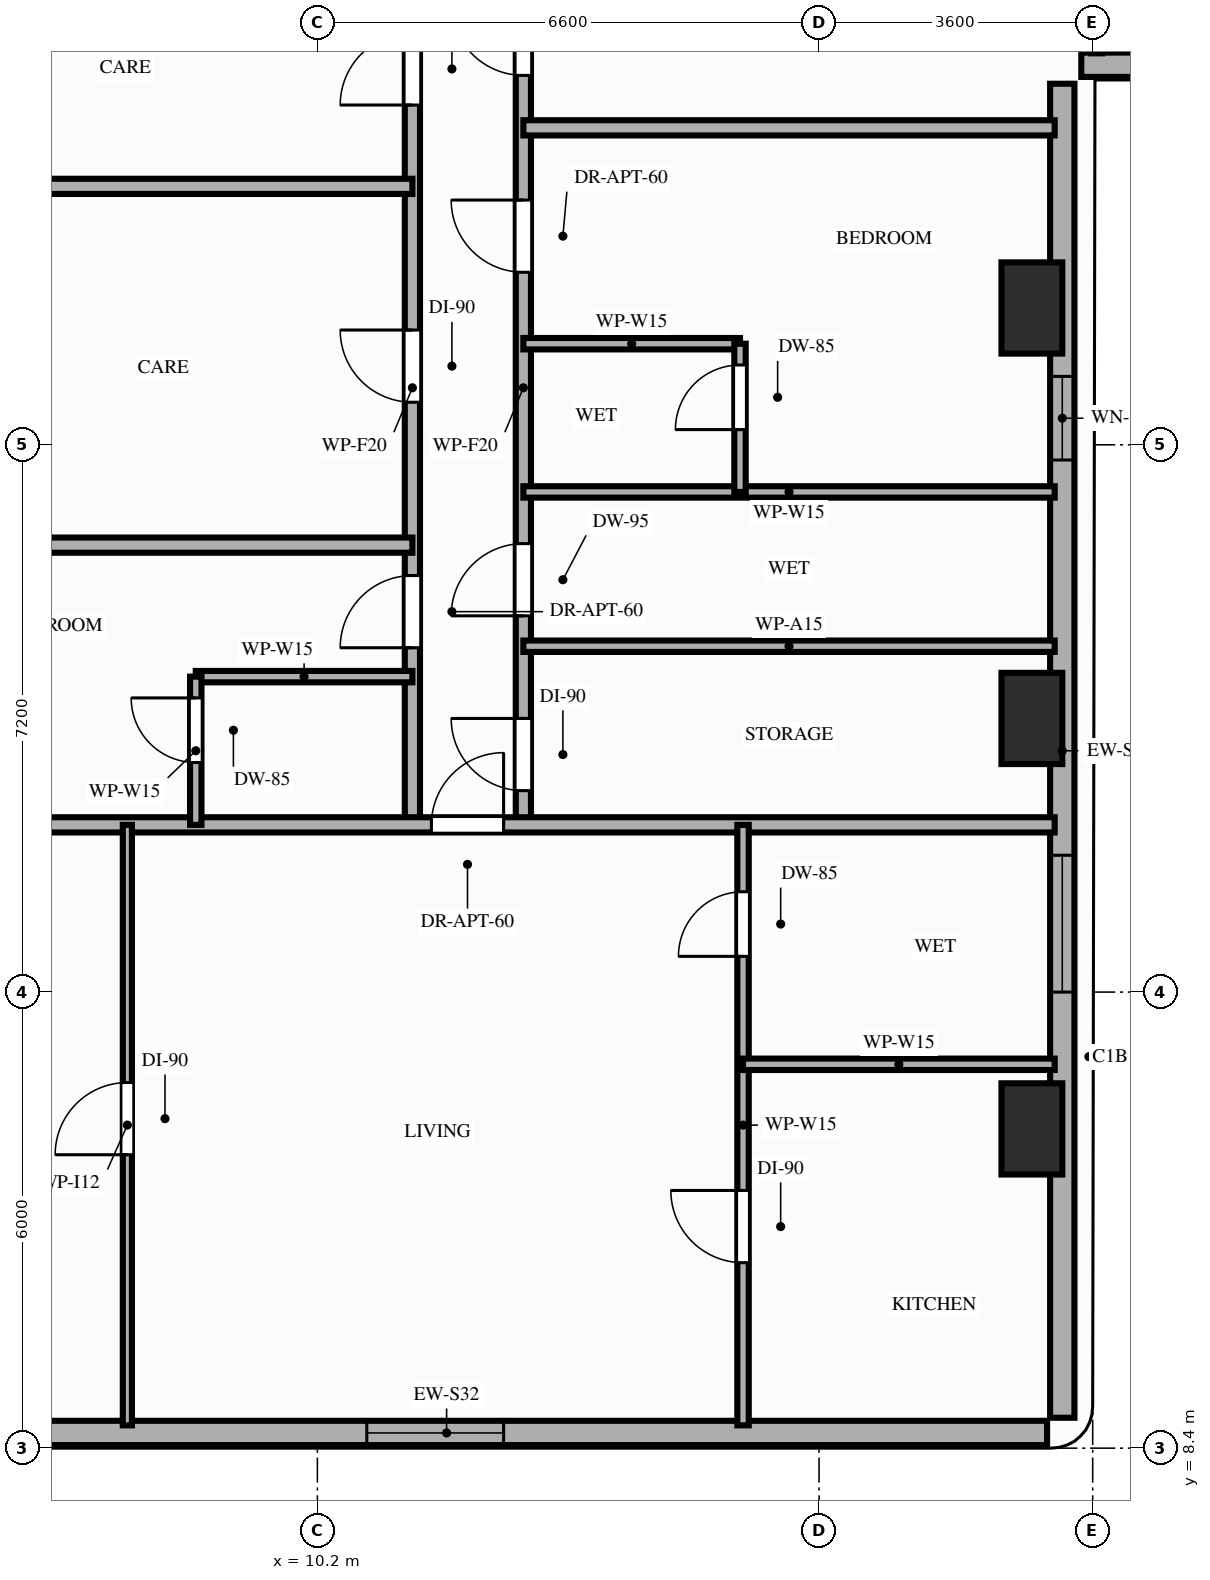
"""IFC4 building model, lengths in metres.
Left out: names, types, materials, properties, quantities, classifications, styles, units other than length and angle.
Written with IfcOpenShell. Run it as: python <this file> out.ifc"""

import sys

from ifc_helpers import new_model, si_unit, direction, frame, frame_2d, origin, origin_2d, place, context, subcontext, project, spatial, rectangle, extrude, element, fill, save


model = new_model("IFC4")
c1 = context("Model", 3, precision=1e-05, world=origin(), true_north=direction((0.0, 1.0)))
c2 = subcontext(c1, "Body", "Model", "MODEL_VIEW")
j1 = project(units=[si_unit("LENGTHUNIT", "METRE"), si_unit("PLANEANGLEUNIT", "RADIAN")], contexts=[c1])
p1 = place(None, origin())
s1 = spatial("IfcSite", under=j1, at=p1, CompositionType="ELEMENT")
p2 = place(p1, origin())
s2 = spatial("IfcBuilding", under=s1, at=p2, CompositionType="ELEMENT")
p3 = place(p2, frame((0.0, 0.0, 93.0)))
s3 = spatial("IfcBuildingStorey", under=s2, at=p3, CompositionType="ELEMENT", Elevation=93.0)
for number, where, z_axis, x_axis in (
    (1, (19.6, 12.6, 0.0), (0.0, 0.0, 1.0), (1.0, 0.0, 0.0)),
    (2, (19.6, 18.0, 0.0), (0.0, 0.0, 1.0), (1.0, 0.0, 0.0)),
    (3, (19.6, 23.4, 0.0), (0.0, 0.0, 1.0), (1.0, 0.0, 0.0)),
):
    element("IfcColumn", number, at=place(p3, frame(where, z_axis=z_axis, x_axis=x_axis)), inside=s3, PredefinedType="COLUMN", context=c2, shape_type="SweptSolid", body=[
        extrude(rectangle(XDim=0.8, YDim=1.2, at=origin_2d()), origin(), (0.0, 0.0, 1.0), 3.2),
    ])
p4 = place(p3, frame((4.0, 8.6, 0.0), z_axis=(0.0, 0.0, 1.0), x_axis=(1.0, 0.0, 0.0)))
e4 = element("IfcWall", 4, at=p4, inside=s3, PredefinedType="STANDARD", context=c2, shape_type="SweptSolid", body=[
    extrude(rectangle(XDim=15.8, YDim=0.32, at=frame_2d((7.9, 0.0))), origin(), (0.0, 0.0, 1.0), 3.02),
])
p5 = place(p4, frame((6.85, 0.0, 0.85)))
e5 = element("IfcOpeningElement", 5, at=p5, cuts=e4, PredefinedType="OPENING", context=c2, shape_type="SweptSolid", body=[
    extrude(rectangle(XDim=1.8, YDim=1.75, at=frame_2d((0.9, 0.875))), frame((0.0, 0.17, 0.0), z_axis=(0.0, -1.0, 0.0), x_axis=(1.0, 0.0, 0.0)), (0.0, 0.0, 1.0), 0.34),
])
p6 = place(p3, frame((20.0, 8.8, 0.0), z_axis=(0.0, 0.0, 1.0), x_axis=(0.0, 1.0, 0.0)))
e6 = element("IfcWall", 6, at=p6, inside=s3, PredefinedType="STANDARD", context=c2, shape_type="SweptSolid", body=[
    extrude(rectangle(XDim=17.55, YDim=0.32, at=frame_2d((8.775, 0.0))), origin(), (0.0, 0.0, 1.0), 2.41),
])
p7 = place(p6, frame((12.6, 0.0, 0.85)))
e7 = element("IfcOpeningElement", 7, at=p7, cuts=e6, PredefinedType="OPENING", context=c2, shape_type="SweptSolid", body=[
    extrude(rectangle(XDim=1.1, YDim=1.31, at=frame_2d((0.55, 0.655))), frame((0.0, 0.17, 0.0), z_axis=(0.0, -1.0, 0.0), x_axis=(1.0, 0.0, 0.0)), (0.0, 0.0, 1.0), 0.34),
])
p8 = place(p6, frame((5.6, 0.0, 0.85)))
e8 = element("IfcOpeningElement", 8, at=p8, cuts=e6, PredefinedType="OPENING", context=c2, shape_type="SweptSolid", body=[
    extrude(rectangle(XDim=1.8, YDim=1.31, at=frame_2d((0.9, 0.655))), frame((0.0, 0.17, 0.0), z_axis=(0.0, -1.0, 0.0), x_axis=(1.0, 0.0, 0.0)), (0.0, 0.0, 1.0), 0.34),
])
p9 = place(p3, frame((20.25, 26.6, 0.0), z_axis=(0.0, 0.0, 1.0), x_axis=(1.0, 0.0, 0.0)))
e9 = element("IfcWall", 9, at=p9, inside=s3, PredefinedType="STANDARD", context=c2, shape_type="SweptSolid", body=[
    extrude(rectangle(XDim=26.15, YDim=0.32, at=frame_2d((13.075, 0.0))), origin(), (0.0, 0.0, 1.0), 2.7),
])
p10 = place(p9, frame((7.95, 0.0, 0.0)))
e10 = element("IfcOpeningElement", 10, at=p10, cuts=e9, PredefinedType="OPENING", context=c2, shape_type="SweptSolid", body=[
    extrude(rectangle(XDim=1.4, YDim=2.1, at=frame_2d((0.7, 1.05))), frame((0.0, 0.17, 0.0), z_axis=(0.0, -1.0, 0.0), x_axis=(1.0, 0.0, 0.0)), (0.0, 0.0, 1.0), 0.34),
])
p11 = place(p9, frame((22.45, 0.0, 0.0)))
e11 = element("IfcOpeningElement", 11, at=p11, cuts=e9, PredefinedType="OPENING", context=c2, shape_type="SweptSolid", body=[
    extrude(rectangle(XDim=1.4, YDim=2.1, at=frame_2d((0.7, 1.05))), frame((0.0, 0.17, 0.0), z_axis=(0.0, -1.0, 0.0), x_axis=(1.0, 0.0, 0.0)), (0.0, 0.0, 1.0), 0.34),
])
p12 = place(p9, frame((2.65, 0.0, 0.85)))
e12 = element("IfcOpeningElement", 12, at=p12, cuts=e9, PredefinedType="OPENING", context=c2, shape_type="SweptSolid", body=[
    extrude(rectangle(XDim=1.8, YDim=1.6, at=frame_2d((0.9, 0.8))), frame((0.0, 0.17, 0.0), z_axis=(0.0, -1.0, 0.0), x_axis=(1.0, 0.0, 0.0)), (0.0, 0.0, 1.0), 0.34),
])
p13 = place(p9, frame((13.65, 0.0, 0.85)))
e13 = element("IfcOpeningElement", 13, at=p13, cuts=e9, PredefinedType="OPENING", context=c2, shape_type="SweptSolid", body=[
    extrude(rectangle(XDim=1.8, YDim=1.6, at=frame_2d((0.9, 0.8))), frame((0.0, 0.17, 0.0), z_axis=(0.0, -1.0, 0.0), x_axis=(1.0, 0.0, 0.0)), (0.0, 0.0, 1.0), 0.34),
])
p14 = place(p3, frame((11.45, 16.6, 0.0), z_axis=(0.0, 0.0, 1.0), x_axis=(0.0, 1.0, 0.0)))
e14 = element("IfcWall", 14, at=p14, inside=s3, PredefinedType="PARTITIONING", context=c2, shape_type="SweptSolid", body=[
    extrude(rectangle(XDim=11.5, YDim=0.2, at=frame_2d((5.75, 0.0))), origin(), (0.0, 0.0, 1.0), 2.41),
])
p15 = place(p14, frame((2.33, 0.0, 0.0)))
e15 = element("IfcOpeningElement", 15, at=p15, cuts=e14, PredefinedType="OPENING", context=c2, shape_type="SweptSolid", body=[
    extrude(rectangle(XDim=0.95, YDim=2.15, at=frame_2d((0.475, 1.075))), frame((0.0, 0.11, 0.0), z_axis=(0.0, -1.0, 0.0), x_axis=(1.0, 0.0, 0.0)), (0.0, 0.0, 1.0), 0.22),
])
p16 = place(p14, frame((5.56, 0.0, 0.0)))
e16 = element("IfcOpeningElement", 16, at=p16, cuts=e14, PredefinedType="OPENING", context=c2, shape_type="SweptSolid", body=[
    extrude(rectangle(XDim=0.95, YDim=2.15, at=frame_2d((0.475, 1.075))), frame((0.0, 0.11, 0.0), z_axis=(0.0, -1.0, 0.0), x_axis=(1.0, 0.0, 0.0)), (0.0, 0.0, 1.0), 0.22),
])
p17 = place(p14, frame((9.47, 0.0, 0.0)))
e17 = element("IfcOpeningElement", 17, at=p17, cuts=e14, PredefinedType="OPENING", context=c2, shape_type="SweptSolid", body=[
    extrude(rectangle(XDim=0.95, YDim=2.15, at=frame_2d((0.475, 1.075))), frame((0.0, 0.11, 0.0), z_axis=(0.0, -1.0, 0.0), x_axis=(1.0, 0.0, 0.0)), (0.0, 0.0, 1.0), 0.22),
])
p18 = place(p3, frame((12.91, 16.6, 0.0), z_axis=(0.0, 0.0, 1.0), x_axis=(0.0, 1.0, 0.0)))
e18 = element("IfcWall", 18, at=p18, inside=s3, PredefinedType="PARTITIONING", context=c2, shape_type="SweptSolid", body=[
    extrude(rectangle(XDim=11.5, YDim=0.2, at=frame_2d((5.75, 0.0))), origin(), (0.0, 0.0, 1.0), 2.41),
])
p19 = place(p18, frame((0.45, 0.0, 0.0)))
e19 = element("IfcOpeningElement", 19, at=p19, cuts=e18, PredefinedType="OPENING", context=c2, shape_type="SweptSolid", body=[
    extrude(rectangle(XDim=0.95, YDim=2.15, at=frame_2d((0.475, 1.075))), frame((0.0, 0.11, 0.0), z_axis=(0.0, -1.0, 0.0), x_axis=(1.0, 0.0, 0.0)), (0.0, 0.0, 1.0), 0.22),
])
p20 = place(p18, frame((2.75, 0.0, 0.0)))
e20 = element("IfcOpeningElement", 20, at=p20, cuts=e18, PredefinedType="OPENING", context=c2, shape_type="SweptSolid", body=[
    extrude(rectangle(XDim=0.95, YDim=2.1, at=frame_2d((0.475, 1.05))), frame((0.0, 0.11, 0.0), z_axis=(0.0, -1.0, 0.0), x_axis=(1.0, 0.0, 0.0)), (0.0, 0.0, 1.0), 0.22),
])
p21 = place(p18, frame((9.86, 0.0, 0.0)))
e21 = element("IfcOpeningElement", 21, at=p21, cuts=e18, PredefinedType="OPENING", context=c2, shape_type="SweptSolid", body=[
    extrude(rectangle(XDim=0.95, YDim=2.15, at=frame_2d((0.475, 1.075))), frame((0.0, 0.11, 0.0), z_axis=(0.0, -1.0, 0.0), x_axis=(1.0, 0.0, 0.0)), (0.0, 0.0, 1.0), 0.22),
])
p22 = place(p18, frame((7.27, 0.0, 0.0)))
e22 = element("IfcOpeningElement", 22, at=p22, cuts=e18, PredefinedType="OPENING", context=c2, shape_type="SweptSolid", body=[
    extrude(rectangle(XDim=0.95, YDim=2.15, at=frame_2d((0.475, 1.075))), frame((0.0, 0.11, 0.0), z_axis=(0.0, -1.0, 0.0), x_axis=(1.0, 0.0, 0.0)), (0.0, 0.0, 1.0), 0.22),
])
p23 = place(p3, frame((3.9, 16.6, 0.0), z_axis=(0.0, 0.0, 1.0), x_axis=(1.0, 0.0, 0.0)))
e23 = element("IfcWall", 23, at=p23, inside=s3, PredefinedType="PARTITIONING", context=c2, shape_type="SweptSolid", body=[
    extrude(rectangle(XDim=16.0, YDim=0.2, at=frame_2d((8.0, 0.0))), origin(), (0.0, 0.0, 1.0), 2.41),
])
p24 = place(p23, frame((7.8, 0.0, 0.0)))
e24 = element("IfcOpeningElement", 24, at=p24, cuts=e23, PredefinedType="OPENING", context=c2, shape_type="SweptSolid", body=[
    extrude(rectangle(XDim=0.95, YDim=2.15, at=frame_2d((0.475, 1.075))), frame((0.0, 0.11, 0.0), z_axis=(0.0, -1.0, 0.0), x_axis=(1.0, 0.0, 0.0)), (0.0, 0.0, 1.0), 0.22),
])
p25 = place(p3, frame((20.45, 26.75, 0.0), z_axis=(0.0, 0.0, 1.0), x_axis=(0.0, 1.0, 0.0)))
e25 = element("IfcWall", 25, at=p25, inside=s3, PredefinedType="PARTITIONING", context=c2, shape_type="SweptSolid", body=[
    extrude(rectangle(XDim=2.95, YDim=0.15, at=frame_2d((1.475, 0.0))), origin(), (0.0, 0.0, 1.0), 2.41),
])
p26 = place(p3, frame((8.6, 18.55, 0.0), z_axis=(0.0, 0.0, 1.0), x_axis=(1.0, 0.0, 0.0)))
e26 = element("IfcWall", 26, at=p26, inside=s3, PredefinedType="PARTITIONING", context=c2, shape_type="SweptSolid", body=[
    extrude(rectangle(XDim=2.85, YDim=0.15, at=frame_2d((1.425, 0.0))), origin(), (0.0, 0.0, 1.0), 3.02),
])
p27 = place(p3, frame((8.6, 16.6, 0.0), z_axis=(0.0, 0.0, 1.0), x_axis=(0.0, 1.0, 0.0)))
e27 = element("IfcWall", 27, at=p27, inside=s3, PredefinedType="PARTITIONING", context=c2, shape_type="SweptSolid", body=[
    extrude(rectangle(XDim=1.95, YDim=0.15, at=frame_2d((0.975, 0.0))), origin(), (0.0, 0.0, 1.0), 2.41),
])
p28 = place(p27, frame((0.82, 0.0, 0.0)))
e28 = element("IfcOpeningElement", 28, at=p28, cuts=e27, PredefinedType="OPENING", context=c2, shape_type="SweptSolid", body=[
    extrude(rectangle(XDim=0.85, YDim=2.1, at=frame_2d((0.425, 1.05))), frame((0.0, 0.085, 0.0), z_axis=(0.0, -1.0, 0.0), x_axis=(1.0, 0.0, 0.0)), (0.0, 0.0, 1.0), 0.17),
])
for number, where, z_axis, x_axis in (
    (29, (3.9, 20.28, 0.0), (0.0, 0.0, 1.0), (1.0, 0.0, 0.0)),
    (30, (3.9, 25.0, 0.0), (0.0, 0.0, 1.0), (1.0, 0.0, 0.0)),
):
    element("IfcWall", number, at=place(p3, frame(where, z_axis=z_axis, x_axis=x_axis)), inside=s3, PredefinedType="PARTITIONING", context=c2, shape_type="SweptSolid", body=[
        extrude(rectangle(XDim=7.55, YDim=0.2, at=frame_2d((3.775, 0.0))), origin(), (0.0, 0.0, 1.0), 2.41),
    ])
p29 = place(p3, frame((7.7, 8.7, 0.0), z_axis=(0.0, 0.0, 1.0), x_axis=(0.0, 1.0, 0.0)))
e31 = element("IfcWall", 31, at=p29, inside=s3, PredefinedType="PARTITIONING", context=c2, shape_type="SweptSolid", body=[
    extrude(rectangle(XDim=7.9, YDim=0.12, at=frame_2d((3.95, 0.0))), origin(), (0.0, 0.0, 1.0), 2.41),
])
p30 = place(p29, frame((3.56, 0.0, 0.0)))
e32 = element("IfcOpeningElement", 32, at=p30, cuts=e31, PredefinedType="OPENING", context=c2, shape_type="SweptSolid", body=[
    extrude(rectangle(XDim=0.95, YDim=2.15, at=frame_2d((0.475, 1.075))), frame((0.0, 0.07, 0.0), z_axis=(0.0, -1.0, 0.0), x_axis=(1.0, 0.0, 0.0)), (0.0, 0.0, 1.0), 0.14),
])
p31 = place(p3, frame((15.8, 8.7, 0.0), z_axis=(0.0, 0.0, 1.0), x_axis=(0.0, 1.0, 0.0)))
e33 = element("IfcWall", 33, at=p31, inside=s3, PredefinedType="PARTITIONING", context=c2, shape_type="SweptSolid", body=[
    extrude(rectangle(XDim=7.9, YDim=0.15, at=frame_2d((3.95, 0.0))), origin(), (0.0, 0.0, 1.0), 2.41),
])
p32 = place(p31, frame((2.14, 0.0, 0.0)))
e34 = element("IfcOpeningElement", 34, at=p32, cuts=e33, PredefinedType="OPENING", context=c2, shape_type="SweptSolid", body=[
    extrude(rectangle(XDim=0.95, YDim=2.15, at=frame_2d((0.475, 1.075))), frame((0.0, 0.085, 0.0), z_axis=(0.0, -1.0, 0.0), x_axis=(1.0, 0.0, 0.0)), (0.0, 0.0, 1.0), 0.17),
])
p33 = place(p31, frame((6.17, 0.0, 0.0)))
e35 = element("IfcOpeningElement", 35, at=p33, cuts=e33, PredefinedType="OPENING", context=c2, shape_type="SweptSolid", body=[
    extrude(rectangle(XDim=0.85, YDim=2.1, at=frame_2d((0.425, 1.05))), frame((0.0, 0.085, 0.0), z_axis=(0.0, -1.0, 0.0), x_axis=(1.0, 0.0, 0.0)), (0.0, 0.0, 1.0), 0.17),
])
p34 = place(p3, frame((15.8, 13.45, 0.0), z_axis=(0.0, 0.0, 1.0), x_axis=(1.0, 0.0, 0.0)))
e36 = element("IfcWall", 36, at=p34, inside=s3, PredefinedType="PARTITIONING", context=c2, shape_type="SweptSolid", body=[
    extrude(rectangle(XDim=4.1, YDim=0.15, at=frame_2d((2.05, 0.0))), origin(), (0.0, 0.0, 1.0), 2.41),
])
for number, where, z_axis, x_axis in (
    (37, (12.91, 18.95, 0.0), (0.0, 0.0, 1.0), (1.0, 0.0, 0.0)),
    (38, (12.91, 20.98, 0.0), (0.0, 0.0, 1.0), (1.0, 0.0, 0.0)),
):
    element("IfcWall", number, at=place(p3, frame(where, z_axis=z_axis, x_axis=x_axis)), inside=s3, PredefinedType="PARTITIONING", context=c2, shape_type="SweptSolid", body=[
        extrude(rectangle(XDim=6.99, YDim=0.15, at=frame_2d((3.495, 0.0))), origin(), (0.0, 0.0, 1.0), 2.41),
    ])
p35 = place(p3, frame((12.91, 25.77, 0.0), z_axis=(0.0, 0.0, 1.0), x_axis=(1.0, 0.0, 0.0)))
e39 = element("IfcWall", 39, at=p35, inside=s3, PredefinedType="PARTITIONING", context=c2, shape_type="SweptSolid", body=[
    extrude(rectangle(XDim=6.99, YDim=0.2, at=frame_2d((3.495, 0.0))), origin(), (0.0, 0.0, 1.0), 2.41),
])
p36 = place(p3, frame((12.91, 22.93, 0.0), z_axis=(0.0, 0.0, 1.0), x_axis=(1.0, 0.0, 0.0)))
e40 = element("IfcWall", 40, at=p36, inside=s3, PredefinedType="PARTITIONING", context=c2, shape_type="SweptSolid", body=[
    extrude(rectangle(XDim=2.85, YDim=0.15, at=frame_2d((1.425, 0.0))), origin(), (0.0, 0.0, 1.0), 3.02),
])
p37 = place(p3, frame((15.76, 20.98, 0.0), z_axis=(0.0, 0.0, 1.0), x_axis=(0.0, 1.0, 0.0)))
e41 = element("IfcWall", 41, at=p37, inside=s3, PredefinedType="PARTITIONING", context=c2, shape_type="SweptSolid", body=[
    extrude(rectangle(XDim=1.95, YDim=0.15, at=frame_2d((0.975, 0.0))), origin(), (0.0, 0.0, 1.0), 2.6),
])
p38 = place(p37, frame((0.82, 0.0, 0.0)))
e42 = element("IfcOpeningElement", 42, at=p38, cuts=e41, PredefinedType="OPENING", context=c2, shape_type="SweptSolid", body=[
    extrude(rectangle(XDim=0.85, YDim=2.1, at=frame_2d((0.425, 1.05))), frame((0.0, 0.085, 0.0), z_axis=(0.0, -1.0, 0.0), x_axis=(1.0, 0.0, 0.0)), (0.0, 0.0, 1.0), 0.17),
])
p39 = place(p5, origin())
e43 = element("IfcWindow", 43, at=p39, inside=s3, PartitioningType="SINGLE_PANEL", PredefinedType="WINDOW", context=c2, shape_type="SweptSolid", body=[
    extrude(rectangle(XDim=1.8, YDim=1.75, at=frame_2d((0.9, 0.875))), frame((0.0, 0.03, 0.0), z_axis=(0.0, -1.0, 0.0), x_axis=(1.0, 0.0, 0.0)), (0.0, 0.0, 1.0), 0.06),
])
fill(e5, e43)
p40 = place(p7, origin())
e44 = element("IfcWindow", 44, at=p40, inside=s3, PartitioningType="SINGLE_PANEL", PredefinedType="WINDOW", context=c2, shape_type="SweptSolid", body=[
    extrude(rectangle(XDim=1.1, YDim=1.31, at=frame_2d((0.55, 0.655))), frame((0.0, 0.03, 0.0), z_axis=(0.0, -1.0, 0.0), x_axis=(1.0, 0.0, 0.0)), (0.0, 0.0, 1.0), 0.06),
])
fill(e7, e44)
p41 = place(p8, origin())
e45 = element("IfcWindow", 45, at=p41, inside=s3, PartitioningType="SINGLE_PANEL", PredefinedType="WINDOW", context=c2, shape_type="SweptSolid", body=[
    extrude(rectangle(XDim=1.8, YDim=1.31, at=frame_2d((0.9, 0.655))), frame((0.0, 0.03, 0.0), z_axis=(0.0, -1.0, 0.0), x_axis=(1.0, 0.0, 0.0)), (0.0, 0.0, 1.0), 0.06),
])
fill(e8, e45)
p42 = place(p28, origin())
e46 = element("IfcDoor", 46, at=p42, inside=s3, OperationType="SINGLE_SWING_RIGHT", PredefinedType="DOOR", context=c2, shape_type="SweptSolid", body=[
    extrude(rectangle(XDim=0.85, YDim=2.1, at=frame_2d((0.425, 1.05))), frame((0.0, 0.025, 0.0), z_axis=(0.0, -1.0, 0.0), x_axis=(1.0, 0.0, 0.0)), (0.0, 0.0, 1.0), 0.05),
])
fill(e28, e46)
p43 = place(p15, origin())
e47 = element("IfcDoor", 47, at=p43, inside=s3, OperationType="SINGLE_SWING_LEFT", PredefinedType="DOOR", context=c2, shape_type="SweptSolid", body=[
    extrude(rectangle(XDim=0.95, YDim=2.15, at=frame_2d((0.475, 1.075))), frame((0.0, 0.025, 0.0), z_axis=(0.0, -1.0, 0.0), x_axis=(1.0, 0.0, 0.0)), (0.0, 0.0, 1.0), 0.05),
])
fill(e15, e47)
p44 = place(p16, origin())
e48 = element("IfcDoor", 48, at=p44, inside=s3, OperationType="SINGLE_SWING_RIGHT", PredefinedType="DOOR", context=c2, shape_type="SweptSolid", body=[
    extrude(rectangle(XDim=0.95, YDim=2.15, at=frame_2d((0.475, 1.075))), frame((0.0, 0.025, 0.0), z_axis=(0.0, -1.0, 0.0), x_axis=(1.0, 0.0, 0.0)), (0.0, 0.0, 1.0), 0.05),
])
fill(e16, e48)
p45 = place(p17, origin())
e49 = element("IfcDoor", 49, at=p45, inside=s3, OperationType="SINGLE_SWING_LEFT", PredefinedType="DOOR", context=c2, shape_type="SweptSolid", body=[
    extrude(rectangle(XDim=0.95, YDim=2.15, at=frame_2d((0.475, 1.075))), frame((0.0, 0.025, 0.0), z_axis=(0.0, -1.0, 0.0), x_axis=(1.0, 0.0, 0.0)), (0.0, 0.0, 1.0), 0.05),
])
fill(e17, e49)
p46 = place(p24, origin())
e50 = element("IfcDoor", 50, at=p46, inside=s3, OperationType="SINGLE_SWING_RIGHT", PredefinedType="DOOR", context=c2, shape_type="SweptSolid", body=[
    extrude(rectangle(XDim=0.95, YDim=2.15, at=frame_2d((0.475, 1.075))), frame((0.0, 0.025, 0.0), z_axis=(0.0, -1.0, 0.0), x_axis=(1.0, 0.0, 0.0)), (0.0, 0.0, 1.0), 0.05),
])
fill(e24, e50)
p47 = place(p30, origin())
e51 = element("IfcDoor", 51, at=p47, inside=s3, OperationType="SINGLE_SWING_LEFT", PredefinedType="DOOR", context=c2, shape_type="SweptSolid", body=[
    extrude(rectangle(XDim=0.95, YDim=2.15, at=frame_2d((0.475, 1.075))), frame((0.0, 0.025, 0.0), z_axis=(0.0, -1.0, 0.0), x_axis=(1.0, 0.0, 0.0)), (0.0, 0.0, 1.0), 0.05),
])
fill(e32, e51)
p48 = place(p32, origin())
e52 = element("IfcDoor", 52, at=p48, inside=s3, OperationType="SINGLE_SWING_RIGHT", PredefinedType="DOOR", context=c2, shape_type="SweptSolid", body=[
    extrude(rectangle(XDim=0.95, YDim=2.15, at=frame_2d((0.475, 1.075))), frame((0.0, 0.025, 0.0), z_axis=(0.0, -1.0, 0.0), x_axis=(1.0, 0.0, 0.0)), (0.0, 0.0, 1.0), 0.05),
])
fill(e34, e52)
p49 = place(p33, origin())
e53 = element("IfcDoor", 53, at=p49, inside=s3, OperationType="SINGLE_SWING_LEFT", PredefinedType="DOOR", context=c2, shape_type="SweptSolid", body=[
    extrude(rectangle(XDim=0.85, YDim=2.1, at=frame_2d((0.425, 1.05))), frame((0.0, 0.025, 0.0), z_axis=(0.0, -1.0, 0.0), x_axis=(1.0, 0.0, 0.0)), (0.0, 0.0, 1.0), 0.05),
])
fill(e35, e53)
p50 = place(p19, origin())
e54 = element("IfcDoor", 54, at=p50, inside=s3, OperationType="SINGLE_SWING_RIGHT", PredefinedType="DOOR", context=c2, shape_type="SweptSolid", body=[
    extrude(rectangle(XDim=0.95, YDim=2.15, at=frame_2d((0.475, 1.075))), frame((0.0, 0.025, 0.0), z_axis=(0.0, -1.0, 0.0), x_axis=(1.0, 0.0, 0.0)), (0.0, 0.0, 1.0), 0.05),
])
fill(e19, e54)
p51 = place(p20, origin())
e55 = element("IfcDoor", 55, at=p51, inside=s3, OperationType="SINGLE_SWING_LEFT", PredefinedType="DOOR", context=c2, shape_type="SweptSolid", body=[
    extrude(rectangle(XDim=0.95, YDim=2.1, at=frame_2d((0.475, 1.05))), frame((0.0, 0.025, 0.0), z_axis=(0.0, -1.0, 0.0), x_axis=(1.0, 0.0, 0.0)), (0.0, 0.0, 1.0), 0.05),
])
fill(e20, e55)
p52 = place(p21, origin())
e56 = element("IfcDoor", 56, at=p52, inside=s3, OperationType="SINGLE_SWING_RIGHT", PredefinedType="DOOR", context=c2, shape_type="SweptSolid", body=[
    extrude(rectangle(XDim=0.95, YDim=2.15, at=frame_2d((0.475, 1.075))), frame((0.0, 0.025, 0.0), z_axis=(0.0, -1.0, 0.0), x_axis=(1.0, 0.0, 0.0)), (0.0, 0.0, 1.0), 0.05),
])
fill(e21, e56)
p53 = place(p38, origin())
e57 = element("IfcDoor", 57, at=p53, inside=s3, OperationType="SINGLE_SWING_LEFT", PredefinedType="DOOR", context=c2, shape_type="SweptSolid", body=[
    extrude(rectangle(XDim=0.85, YDim=2.1, at=frame_2d((0.425, 1.05))), frame((0.0, 0.025, 0.0), z_axis=(0.0, -1.0, 0.0), x_axis=(1.0, 0.0, 0.0)), (0.0, 0.0, 1.0), 0.05),
])
fill(e42, e57)
p54 = place(p22, origin())
e58 = element("IfcDoor", 58, at=p54, inside=s3, OperationType="SINGLE_SWING_RIGHT", PredefinedType="DOOR", context=c2, shape_type="SweptSolid", body=[
    extrude(rectangle(XDim=0.95, YDim=2.15, at=frame_2d((0.475, 1.075))), frame((0.0, 0.025, 0.0), z_axis=(0.0, -1.0, 0.0), x_axis=(1.0, 0.0, 0.0)), (0.0, 0.0, 1.0), 0.05),
])
fill(e22, e58)
save(model, sys.argv[1])
